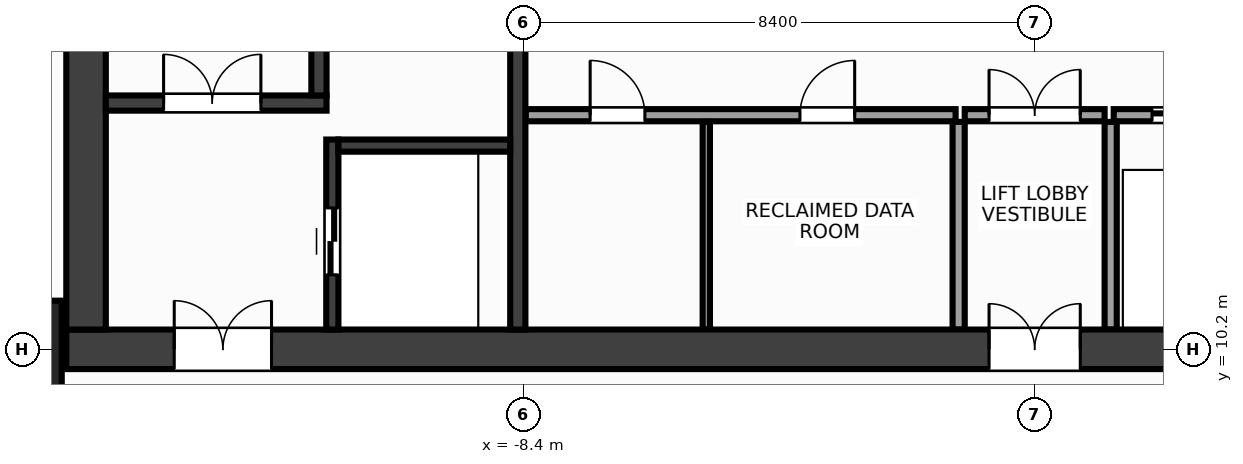
"""IFC4 building model, lengths in metres.
Left out: names, types, materials, properties, quantities, classifications, styles, units other than length and angle.
Written with IfcOpenShell. Run it as: python <this file> out.ifc"""

import sys

from ifc_helpers import new_model, si_unit, direction, frame, frame_2d, origin, origin_2d, place, context, subcontext, project, spatial, rectangle, extrude, source, transform, mapped, element, fill, save


model = new_model("IFC4")
c1 = context("Model", 3, precision=1e-05, world=origin(), true_north=direction((0.0, 1.0)))
c2 = subcontext(c1, "Body", "Model", "MODEL_VIEW")
j1 = project(units=[si_unit("LENGTHUNIT", "METRE"), si_unit("PLANEANGLEUNIT", "RADIAN")], contexts=[c1])
p1 = place(None, origin())
s1 = spatial("IfcSite", under=j1, at=p1, CompositionType="ELEMENT")
p2 = place(p1, origin())
s2 = spatial("IfcBuilding", under=s1, at=p2, CompositionType="ELEMENT")
p3 = place(p2, frame((0.0, 0.0, 95.6)))
s3 = spatial("IfcBuildingStorey", under=s2, at=p3, CompositionType="ELEMENT", Elevation=95.6)
m1 = source(origin(), c2, "Body", "SweptSolid", [
    extrude(rectangle(XDim=31.85, YDim=0.65, at=frame_2d((15.925, 0.0))), origin(), (0.0, 0.0, 1.0), 3.6),
])
p4 = place(p3, frame((-15.925, 10.2, 0.0), z_axis=(0.0, 0.0, 1.0), x_axis=(1.0, 0.0, 0.0)))
e1 = element("IfcWall", 1, at=p4, inside=s3, PredefinedType="SHEAR", context=c2, shape_type="MappedRepresentation", body=[
    mapped(m1, transform((0.0, 0.0, 0.0), x_axis=(1.0, 0.0, 0.0), y_axis=(0.0, 1.0, 0.0), z_axis=(0.0, 0.0, 1.0), scale=1.0)),
])
p5 = place(p4, frame((1.775, 0.0, 0.0)))
e2 = element("IfcOpeningElement", 2, at=p5, cuts=e1, PredefinedType="OPENING", context=c2, shape_type="SweptSolid", body=[
    extrude(rectangle(XDim=1.6, YDim=2.15, at=frame_2d((0.8, 1.075))), frame((0.0, 0.337, 0.0), z_axis=(0.0, -1.0, 0.0), x_axis=(1.0, 0.0, 0.0)), (0.0, 0.0, 1.0), 0.674),
])
p6 = place(p4, frame((28.475, 0.0, 0.0)))
e3 = element("IfcOpeningElement", 3, at=p6, cuts=e1, PredefinedType="OPENING", context=c2, shape_type="SweptSolid", body=[
    extrude(rectangle(XDim=1.6, YDim=2.15, at=frame_2d((0.8, 1.075))), frame((0.0, 0.337, 0.0), z_axis=(0.0, -1.0, 0.0), x_axis=(1.0, 0.0, 0.0)), (0.0, 0.0, 1.0), 0.674),
])
p7 = place(p4, frame((15.175, 0.0, 0.0)))
e4 = element("IfcOpeningElement", 4, at=p7, cuts=e1, PredefinedType="OPENING", context=c2, shape_type="SweptSolid", body=[
    extrude(rectangle(XDim=1.5, YDim=2.2, at=frame_2d((0.75, 1.1))), frame((0.0, 0.337, 0.0), z_axis=(0.0, -1.0, 0.0), x_axis=(1.0, 0.0, 0.0)), (0.0, 0.0, 1.0), 0.674),
])
m2 = source(origin(), c2, "Body", "SweptSolid", [
    extrude(rectangle(XDim=12.95, YDim=0.65, at=frame_2d((6.475, 0.0))), origin(), (0.0, 0.0, 1.0), 3.6),
])
p8 = place(p3, frame((-15.6, 10.525, 0.0), z_axis=(0.0, 0.0, 1.0), x_axis=(0.0, 1.0, 0.0)))
e5 = element("IfcWall", 5, at=p8, inside=s3, PredefinedType="SHEAR", context=c2, shape_type="MappedRepresentation", body=[
    mapped(m2, transform((0.0, 0.0, 0.0), x_axis=(1.0, 0.0, 0.0), y_axis=(0.0, 1.0, 0.0), z_axis=(0.0, 0.0, 1.0), scale=1.0)),
])
m3 = source(origin(), c2, "Body", "SweptSolid", [
    extrude(rectangle(XDim=12.95, YDim=0.25, at=frame_2d((6.475, 0.0))), origin(), (0.0, 0.0, 1.0), 3.6),
])
p9 = place(p3, frame((-8.5, 10.525, 0.0), z_axis=(0.0, 0.0, 1.0), x_axis=(0.0, 1.0, 0.0)))
e6 = element("IfcWall", 6, at=p9, inside=s3, PredefinedType="SHEAR", context=c2, shape_type="MappedRepresentation", body=[
    mapped(m3, transform((0.0, 0.0, 0.0), x_axis=(1.0, 0.0, 0.0), y_axis=(0.0, 1.0, 0.0), z_axis=(0.0, 0.0, 1.0), scale=1.0)),
])
p10 = place(p9, frame((5.075, 0.0, 0.0)))
e7 = element("IfcOpeningElement", 7, at=p10, cuts=e6, PredefinedType="OPENING", context=c2, shape_type="SweptSolid", body=[
    extrude(rectangle(XDim=0.95, YDim=2.15, at=frame_2d((0.475, 1.075))), frame((0.0, 0.137, 0.0), z_axis=(0.0, -1.0, 0.0), x_axis=(1.0, 0.0, 0.0)), (0.0, 0.0, 1.0), 0.274),
])
p11 = place(p9, frame((8.175, 0.0, 0.0)))
e8 = element("IfcOpeningElement", 8, at=p11, cuts=e6, PredefinedType="OPENING", context=c2, shape_type="SweptSolid", body=[
    extrude(rectangle(XDim=0.95, YDim=2.15, at=frame_2d((0.475, 1.075))), frame((0.0, 0.137, 0.0), z_axis=(0.0, -1.0, 0.0), x_axis=(1.0, 0.0, 0.0)), (0.0, 0.0, 1.0), 0.274),
])
m4 = source(origin(), c2, "Body", "SweptSolid", [
    extrude(rectangle(XDim=3.63, YDim=0.25, at=frame_2d((1.815, 0.0))), origin(), (0.0, 0.0, 1.0), 3.6),
])
p12 = place(p3, frame((-15.275, 14.25, 0.0), z_axis=(0.0, 0.0, 1.0), x_axis=(1.0, 0.0, 0.0)))
e9 = element("IfcWall", 9, at=p12, inside=s3, PredefinedType="SHEAR", context=c2, shape_type="MappedRepresentation", body=[
    mapped(m4, transform((0.0, 0.0, 0.0), x_axis=(1.0, 0.0, 0.0), y_axis=(0.0, 1.0, 0.0), z_axis=(0.0, 0.0, 1.0), scale=1.0)),
])
p13 = place(p12, frame((0.95, 0.0, 0.0)))
e10 = element("IfcOpeningElement", 10, at=p13, cuts=e9, PredefinedType="OPENING", context=c2, shape_type="SweptSolid", body=[
    extrude(rectangle(XDim=1.6, YDim=2.15, at=frame_2d((0.8, 1.075))), frame((0.0, 0.137, 0.0), z_axis=(0.0, -1.0, 0.0), x_axis=(1.0, 0.0, 0.0)), (0.0, 0.0, 1.0), 0.274),
])
m5 = source(origin(), c2, "Body", "SweptSolid", [
    extrude(rectangle(XDim=9.1, YDim=0.25, at=frame_2d((4.55, 0.0))), origin(), (0.0, 0.0, 1.0), 3.6),
])
p14 = place(p3, frame((-11.77, 14.375, 0.0), z_axis=(0.0, 0.0, 1.0), x_axis=(0.0, 1.0, 0.0)))
e11 = element("IfcWall", 11, at=p14, inside=s3, PredefinedType="SHEAR", context=c2, shape_type="MappedRepresentation", body=[
    mapped(m5, transform((0.0, 0.0, 0.0), x_axis=(1.0, 0.0, 0.0), y_axis=(0.0, 1.0, 0.0), z_axis=(0.0, 0.0, 1.0), scale=1.0)),
])
m6 = source(origin(), c2, "Body", "SweptSolid", [
    extrude(rectangle(XDim=3.125, YDim=0.2, at=frame_2d((1.562, 0.0))), origin(), (0.0, 0.0, 1.0), 3.6),
])
p15 = place(p3, frame((-11.55, 10.525, 0.0), z_axis=(0.0, 0.0, 1.0), x_axis=(0.0, 1.0, 0.0)))
e12 = element("IfcWall", 12, at=p15, inside=s3, PredefinedType="SHEAR", context=c2, shape_type="MappedRepresentation", body=[
    mapped(m6, transform((0.0, 0.0, 0.0), x_axis=(1.0, 0.0, 0.0), y_axis=(0.0, 1.0, 0.0), z_axis=(0.0, 0.0, 1.0), scale=1.0)),
])
p16 = place(p15, frame((0.9, 0.0, 0.0)))
e13 = element("IfcOpeningElement", 13, at=p16, cuts=e12, PredefinedType="OPENING", context=c2, shape_type="SweptSolid", body=[
    extrude(rectangle(XDim=1.1, YDim=2.15, at=frame_2d((0.55, 1.075))), frame((0.0, 0.112, 0.0), z_axis=(0.0, -1.0, 0.0), x_axis=(1.0, 0.0, 0.0)), (0.0, 0.0, 1.0), 0.224),
])
m7 = source(origin(), c2, "Body", "SweptSolid", [
    extrude(rectangle(XDim=2.825, YDim=0.2, at=frame_2d((1.413, 0.0))), origin(), (0.0, 0.0, 1.0), 3.6),
])
p17 = place(p3, frame((-11.45, 13.55, 0.0), z_axis=(0.0, 0.0, 1.0), x_axis=(1.0, 0.0, 0.0)))
e14 = element("IfcWall", 14, at=p17, inside=s3, PredefinedType="SHEAR", context=c2, shape_type="MappedRepresentation", body=[
    mapped(m7, transform((0.0, 0.0, 0.0), x_axis=(1.0, 0.0, 0.0), y_axis=(0.0, 1.0, 0.0), z_axis=(0.0, 0.0, 1.0), scale=1.0)),
])
m8 = source(origin(), c2, "Body", "SweptSolid", [
    extrude(rectangle(XDim=1.6, YDim=1.6, at=origin_2d()), origin(), (0.0, 0.0, 1.0), 3.6),
])
p18 = place(p3, frame((-16.8, 10.2, 0.0), z_axis=(0.0, 0.0, 1.0), x_axis=(1.0, 0.0, 0.0)))
e15 = element("IfcColumn", 15, at=p18, inside=s3, PredefinedType="COLUMN", context=c2, shape_type="MappedRepresentation", body=[
    mapped(m8, transform((0.0, 0.0, 0.0), x_axis=(1.0, 0.0, 0.0), y_axis=(0.0, 1.0, 0.0), z_axis=(0.0, 0.0, 1.0), scale=1.0)),
])
m9 = source(origin(), c2, "Body", "SweptSolid", [
    extrude(rectangle(XDim=7.07, YDim=0.2, at=frame_2d((3.535, 0.0))), origin(), (0.0, 0.0, 1.0), 3.36),
])
p19 = place(p3, frame((-8.37, 14.05, 0.0), z_axis=(0.0, 0.0, 1.0), x_axis=(1.0, 0.0, 0.0)))
e16 = element("IfcWall", 16, at=p19, inside=s3, PredefinedType="PARTITIONING", context=c2, shape_type="MappedRepresentation", body=[
    mapped(m9, transform((0.0, 0.0, 0.0), x_axis=(1.0, 0.0, 0.0), y_axis=(0.0, 1.0, 0.0), z_axis=(0.0, 0.0, 1.0), scale=1.0)),
])
p20 = place(p19, frame((1.06, 0.0, 0.0)))
e17 = element("IfcOpeningElement", 17, at=p20, cuts=e16, PredefinedType="OPENING", context=c2, shape_type="SweptSolid", body=[
    extrude(rectangle(XDim=0.9, YDim=2.15, at=frame_2d((0.45, 1.075))), frame((0.0, 0.112, 0.0), z_axis=(0.0, -1.0, 0.0), x_axis=(1.0, 0.0, 0.0)), (0.0, 0.0, 1.0), 0.224),
])
p21 = place(p19, frame((4.51, 0.0, 0.0)))
e18 = element("IfcOpeningElement", 18, at=p21, cuts=e16, PredefinedType="OPENING", context=c2, shape_type="SweptSolid", body=[
    extrude(rectangle(XDim=0.9, YDim=2.15, at=frame_2d((0.45, 1.075))), frame((0.0, 0.112, 0.0), z_axis=(0.0, -1.0, 0.0), x_axis=(1.0, 0.0, 0.0)), (0.0, 0.0, 1.0), 0.224),
])
p22 = place(p3, frame((1.3, 14.05, 0.0), z_axis=(0.0, 0.0, 1.0), x_axis=(1.0, 0.0, 0.0)))
e19 = element("IfcWall", 19, at=p22, inside=s3, PredefinedType="PARTITIONING", context=c2, shape_type="MappedRepresentation", body=[
    mapped(m9, transform((0.0, 0.0, 0.0), x_axis=(1.0, 0.0, 0.0), y_axis=(0.0, 1.0, 0.0), z_axis=(0.0, 0.0, 1.0), scale=1.0)),
])
p23 = place(p22, frame((0.63, 0.0, 0.0)))
e20 = element("IfcOpeningElement", 20, at=p23, cuts=e19, PredefinedType="OPENING", context=c2, shape_type="SweptSolid", body=[
    extrude(rectangle(XDim=1.1, YDim=2.15, at=frame_2d((0.55, 1.075))), frame((0.0, 0.112, 0.0), z_axis=(0.0, -1.0, 0.0), x_axis=(1.0, 0.0, 0.0)), (0.0, 0.0, 1.0), 0.224),
])
p24 = place(p22, frame((2.98, 0.0, 0.0)))
e21 = element("IfcOpeningElement", 21, at=p24, cuts=e19, PredefinedType="OPENING", context=c2, shape_type="SweptSolid", body=[
    extrude(rectangle(XDim=1.1, YDim=2.15, at=frame_2d((0.55, 1.075))), frame((0.0, 0.112, 0.0), z_axis=(0.0, -1.0, 0.0), x_axis=(1.0, 0.0, 0.0)), (0.0, 0.0, 1.0), 0.224),
])
p25 = place(p22, frame((5.33, 0.0, 0.0)))
e22 = element("IfcOpeningElement", 22, at=p25, cuts=e19, PredefinedType="OPENING", context=c2, shape_type="SweptSolid", body=[
    extrude(rectangle(XDim=1.1, YDim=2.15, at=frame_2d((0.55, 1.075))), frame((0.0, 0.112, 0.0), z_axis=(0.0, -1.0, 0.0), x_axis=(1.0, 0.0, 0.0)), (0.0, 0.0, 1.0), 0.224),
])
m10 = source(origin(), c2, "Body", "SweptSolid", [
    extrude(rectangle(XDim=3.415, YDim=0.2, at=frame_2d((1.708, 0.0))), origin(), (0.0, 0.0, 1.0), 3.36),
])
for number, where, z_axis, x_axis in (
    (23, (-1.25, 10.525, 0.0), (0.0, 0.0, 1.0), (0.0, 1.0, 0.0)),
    (24, (1.25, 10.525, 0.0), (0.0, 0.0, 1.0), (0.0, 1.0, 0.0)),
):
    element("IfcWall", number, at=place(p3, frame(where, z_axis=z_axis, x_axis=x_axis)), inside=s3, PredefinedType="PARTITIONING", context=c2, shape_type="MappedRepresentation", body=[
        mapped(m10, transform((0.0, 0.0, 0.0), x_axis=(1.0, 0.0, 0.0), y_axis=(0.0, 1.0, 0.0), z_axis=(0.0, 0.0, 1.0), scale=1.0)),
    ])
m11 = source(origin(), c2, "Body", "SweptSolid", [
    extrude(rectangle(XDim=2.3, YDim=0.2, at=frame_2d((1.15, 0.0))), origin(), (0.0, 0.0, 1.0), 3.36),
])
p26 = place(p3, frame((-1.15, 14.05, 0.0), z_axis=(0.0, 0.0, 1.0), x_axis=(1.0, 0.0, 0.0)))
e25 = element("IfcWall", 25, at=p26, inside=s3, PredefinedType="PARTITIONING", context=c2, shape_type="MappedRepresentation", body=[
    mapped(m11, transform((0.0, 0.0, 0.0), x_axis=(1.0, 0.0, 0.0), y_axis=(0.0, 1.0, 0.0), z_axis=(0.0, 0.0, 1.0), scale=1.0)),
])
p27 = place(p26, frame((0.4, 0.0, 0.0)))
e26 = element("IfcOpeningElement", 26, at=p27, cuts=e25, PredefinedType="OPENING", context=c2, shape_type="SweptSolid", body=[
    extrude(rectangle(XDim=1.5, YDim=2.2, at=frame_2d((0.75, 1.1))), frame((0.0, 0.112, 0.0), z_axis=(0.0, -1.0, 0.0), x_axis=(1.0, 0.0, 0.0)), (0.0, 0.0, 1.0), 0.224),
])
m12 = source(origin(), c2, "Body", "SweptSolid", [
    extrude(rectangle(XDim=3.415, YDim=0.12, at=frame_2d((1.708, 0.0))), origin(), (0.0, 0.0, 1.0), 3.36),
])
p28 = place(p3, frame((-5.4, 10.525, 0.0), z_axis=(0.0, 0.0, 1.0), x_axis=(0.0, 1.0, 0.0)))
e27 = element("IfcWall", 27, at=p28, inside=s3, PredefinedType="PARTITIONING", context=c2, shape_type="MappedRepresentation", body=[
    mapped(m12, transform((0.0, 0.0, 0.0), x_axis=(1.0, 0.0, 0.0), y_axis=(0.0, 1.0, 0.0), z_axis=(0.0, 0.0, 1.0), scale=1.0)),
])
m13 = source(origin(), c2, "Body", "SweptSolid", [
    extrude(rectangle(XDim=1.6, YDim=2.15, at=frame_2d((0.8, 1.075))), frame((0.0, 0.025, 0.0), z_axis=(0.0, -1.0, 0.0), x_axis=(1.0, 0.0, 0.0)), (0.0, 0.0, 1.0), 0.05),
])
p29 = place(p13, origin())
e28 = element("IfcDoor", 28, at=p29, inside=s3, OperationType="DOUBLE_DOOR_SINGLE_SWING", PredefinedType="DOOR", context=c2, shape_type="MappedRepresentation", body=[
    mapped(m13, transform((0.0, 0.0, 0.0), x_axis=(1.0, 0.0, 0.0), y_axis=(0.0, 1.0, 0.0), z_axis=(0.0, 0.0, 1.0), scale=1.0)),
])
fill(e10, e28)
p30 = place(p5, origin())
e29 = element("IfcDoor", 29, at=p30, inside=s3, OperationType="DOUBLE_DOOR_SINGLE_SWING", PredefinedType="DOOR", context=c2, shape_type="MappedRepresentation", body=[
    mapped(m13, transform((0.0, 0.0, 0.0), x_axis=(1.0, 0.0, 0.0), y_axis=(0.0, 1.0, 0.0), z_axis=(0.0, 0.0, 1.0), scale=1.0)),
])
fill(e2, e29)
m14 = source(origin(), c2, "Body", "SweptSolid", [
    extrude(rectangle(XDim=1.1, YDim=2.15, at=frame_2d((0.55, 1.075))), frame((0.0, 0.025, 0.0), z_axis=(0.0, -1.0, 0.0), x_axis=(1.0, 0.0, 0.0)), (0.0, 0.0, 1.0), 0.05),
])
p31 = place(p16, origin())
e30 = element("IfcDoor", 30, at=p31, inside=s3, OperationType="DOUBLE_DOOR_SLIDING", PredefinedType="DOOR", context=c2, shape_type="MappedRepresentation", body=[
    mapped(m14, transform((0.0, 0.0, 0.0), x_axis=(1.0, 0.0, 0.0), y_axis=(0.0, 1.0, 0.0), z_axis=(0.0, 0.0, 1.0), scale=1.0)),
])
fill(e13, e30)
m15 = source(origin(), c2, "Body", "SweptSolid", [
    extrude(rectangle(XDim=0.9, YDim=2.15, at=frame_2d((0.45, 1.075))), frame((0.0, 0.025, 0.0), z_axis=(0.0, -1.0, 0.0), x_axis=(1.0, 0.0, 0.0)), (0.0, 0.0, 1.0), 0.05),
])
p32 = place(p20, origin())
e31 = element("IfcDoor", 31, at=p32, inside=s3, OperationType="SINGLE_SWING_LEFT", PredefinedType="DOOR", context=c2, shape_type="MappedRepresentation", body=[
    mapped(m15, transform((0.0, 0.0, 0.0), x_axis=(1.0, 0.0, 0.0), y_axis=(0.0, 1.0, 0.0), z_axis=(0.0, 0.0, 1.0), scale=1.0)),
])
fill(e17, e31)
p33 = place(p21, origin())
e32 = element("IfcDoor", 32, at=p33, inside=s3, OperationType="SINGLE_SWING_RIGHT", PredefinedType="DOOR", context=c2, shape_type="MappedRepresentation", body=[
    mapped(m15, transform((0.0, 0.0, 0.0), x_axis=(1.0, 0.0, 0.0), y_axis=(0.0, 1.0, 0.0), z_axis=(0.0, 0.0, 1.0), scale=1.0)),
])
fill(e18, e32)
p34 = place(p23, origin())
e33 = element("IfcDoor", 33, at=p34, inside=s3, OperationType="DOUBLE_DOOR_SLIDING", PredefinedType="DOOR", context=c2, shape_type="MappedRepresentation", body=[
    mapped(m14, transform((0.0, 0.0, 0.0), x_axis=(1.0, 0.0, 0.0), y_axis=(0.0, 1.0, 0.0), z_axis=(0.0, 0.0, 1.0), scale=1.0)),
])
fill(e20, e33)
m16 = source(origin(), c2, "Body", "SweptSolid", [
    extrude(rectangle(XDim=1.5, YDim=2.2, at=frame_2d((0.75, 1.1))), frame((0.0, 0.025, 0.0), z_axis=(0.0, -1.0, 0.0), x_axis=(1.0, 0.0, 0.0)), (0.0, 0.0, 1.0), 0.05),
])
p35 = place(p27, origin())
e34 = element("IfcDoor", 34, at=p35, inside=s3, OperationType="DOUBLE_DOOR_SINGLE_SWING", PredefinedType="DOOR", context=c2, shape_type="MappedRepresentation", body=[
    mapped(m16, transform((0.0, 0.0, 0.0), x_axis=(1.0, 0.0, 0.0), y_axis=(0.0, 1.0, 0.0), z_axis=(0.0, 0.0, 1.0), scale=1.0)),
])
fill(e26, e34)
p36 = place(p7, origin())
e35 = element("IfcDoor", 35, at=p36, inside=s3, OperationType="DOUBLE_DOOR_SINGLE_SWING", PredefinedType="DOOR", context=c2, shape_type="MappedRepresentation", body=[
    mapped(m16, transform((0.0, 0.0, 0.0), x_axis=(1.0, 0.0, 0.0), y_axis=(0.0, 1.0, 0.0), z_axis=(0.0, 0.0, 1.0), scale=1.0)),
])
fill(e4, e35)
save(model, sys.argv[1])
